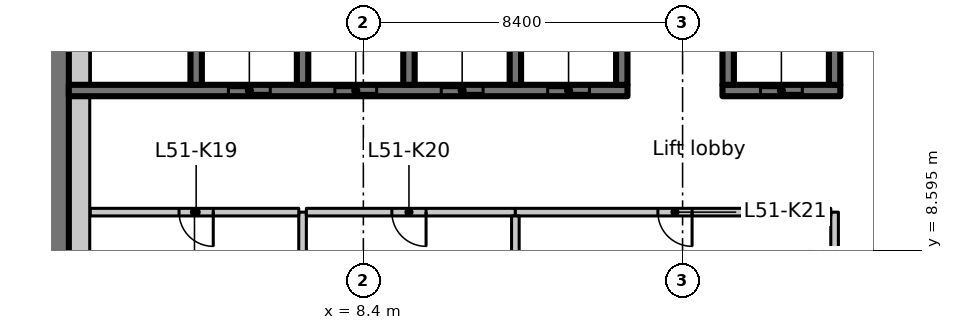
"""IFC4 building model, lengths in metres.
Left out: names, types, materials, properties, quantities, classifications, styles, units other than length and angle.
Written with IfcOpenShell. Run it as: python <this file> out.ifc"""

import sys

from ifc_helpers import new_model, si_unit, direction, frame, frame_2d, origin, place, context, subcontext, project, spatial, rectangle, extrude, element, fill, save


model = new_model("IFC4")
c1 = context("Model", 3, precision=1e-05, world=origin(), true_north=direction((0.0, 1.0)))
c2 = subcontext(c1, "Body", "Model", "MODEL_VIEW")
j1 = project(units=[si_unit("LENGTHUNIT", "METRE"), si_unit("PLANEANGLEUNIT", "RADIAN")], contexts=[c1])
p1 = place(None, origin())
s1 = spatial("IfcSite", under=j1, at=p1, CompositionType="ELEMENT")
p2 = place(p1, origin())
s2 = spatial("IfcBuilding", under=s1, at=p2, CompositionType="ELEMENT")
p3 = place(p2, frame((0.0, 0.0, 202.8)))
s3 = spatial("IfcBuildingStorey", under=s2, at=p3, CompositionType="ELEMENT", Elevation=202.8)
p4 = place(p3, frame((0.325, 7.286, 0.0), z_axis=(0.0, 0.0, 1.0), x_axis=(0.0, 1.0, 0.0)))
e1 = element("IfcWall", 1, at=p4, inside=s3, PredefinedType="SHEAR", context=c2, shape_type="SweptSolid", body=[
    extrude(rectangle(XDim=8.864, YDim=0.65, at=frame_2d((4.432, 0.0))), origin(), (0.0, 0.0, 1.0), 3.3),
])
p5 = place(p3, frame((0.65, 12.8, 0.0), z_axis=(0.0, 0.0, 1.0), x_axis=(1.0, 0.0, 0.0)))
e2 = element("IfcWall", 2, at=p5, inside=s3, PredefinedType="SHEAR", context=c2, shape_type="SweptSolid", body=[
    extrude(rectangle(XDim=14.7, YDim=0.3, at=frame_2d((7.35, 0.0))), origin(), (0.0, 0.0, 1.0), 3.3),
])
p6 = place(p5, frame((4.2, 0.0, 0.0)))
e3 = element("IfcOpeningElement", 3, at=p6, cuts=e2, PredefinedType="OPENING", context=c2, shape_type="SweptSolid", body=[
    extrude(rectangle(XDim=1.1, YDim=2.3, at=frame_2d((0.55, 1.15))), frame((0.0, 0.16, 0.0), z_axis=(0.0, -1.0, 0.0), x_axis=(1.0, 0.0, 0.0)), (0.0, 0.0, 1.0), 0.32),
])
p7 = place(p5, frame((7.0, 0.0, 0.0)))
e4 = element("IfcOpeningElement", 4, at=p7, cuts=e2, PredefinedType="OPENING", context=c2, shape_type="SweptSolid", body=[
    extrude(rectangle(XDim=1.1, YDim=2.3, at=frame_2d((0.55, 1.15))), frame((0.0, 0.16, 0.0), z_axis=(0.0, -1.0, 0.0), x_axis=(1.0, 0.0, 0.0)), (0.0, 0.0, 1.0), 0.32),
])
p8 = place(p5, frame((9.8, 0.0, 0.0)))
e5 = element("IfcOpeningElement", 5, at=p8, cuts=e2, PredefinedType="OPENING", context=c2, shape_type="SweptSolid", body=[
    extrude(rectangle(XDim=1.1, YDim=2.3, at=frame_2d((0.55, 1.15))), frame((0.0, 0.16, 0.0), z_axis=(0.0, -1.0, 0.0), x_axis=(1.0, 0.0, 0.0)), (0.0, 0.0, 1.0), 0.32),
])
p9 = place(p5, frame((12.6, 0.0, 0.0)))
e6 = element("IfcOpeningElement", 6, at=p9, cuts=e2, PredefinedType="OPENING", context=c2, shape_type="SweptSolid", body=[
    extrude(rectangle(XDim=1.1, YDim=2.3, at=frame_2d((0.55, 1.15))), frame((0.0, 0.16, 0.0), z_axis=(0.0, -1.0, 0.0), x_axis=(1.0, 0.0, 0.0)), (0.0, 0.0, 1.0), 0.32),
])
for number, where, z_axis, x_axis in (
    (7, (4.0, 12.95, 0.0), (0.0, 0.0, 1.0), (0.0, 1.0, 0.0)),
    (8, (6.8, 12.95, 0.0), (0.0, 0.0, 1.0), (0.0, 1.0, 0.0)),
    (9, (9.6, 12.95, 0.0), (0.0, 0.0, 1.0), (0.0, 1.0, 0.0)),
    (10, (12.4, 12.95, 0.0), (0.0, 0.0, 1.0), (0.0, 1.0, 0.0)),
    (11, (15.2, 12.95, 0.0), (0.0, 0.0, 1.0), (0.0, 1.0, 0.0)),
):
    element("IfcWall", number, at=place(p3, frame(where, z_axis=z_axis, x_axis=x_axis)), inside=s3, PredefinedType="SHEAR", context=c2, shape_type="SweptSolid", body=[
        extrude(rectangle(XDim=3.2, YDim=0.3, at=frame_2d((1.6, 0.0))), origin(), (0.0, 0.0, 1.0), 3.3),
    ])
p10 = place(p3, frame((17.85, 12.8, 0.0), z_axis=(0.0, 0.0, 1.0), x_axis=(1.0, 0.0, 0.0)))
e12 = element("IfcWall", 12, at=p10, inside=s3, PredefinedType="SHEAR", context=c2, shape_type="SweptSolid", body=[
    extrude(rectangle(XDim=3.1, YDim=0.3, at=frame_2d((1.55, 0.0))), origin(), (0.0, 0.0, 1.0), 3.3),
])
p11 = place(p10, frame((1.0, 0.0, 0.0)))
e13 = element("IfcOpeningElement", 13, at=p11, cuts=e12, PredefinedType="OPENING", context=c2, shape_type="SweptSolid", body=[
    extrude(rectangle(XDim=1.1, YDim=2.3, at=frame_2d((0.55, 1.15))), frame((0.0, 0.16, 0.0), z_axis=(0.0, -1.0, 0.0), x_axis=(1.0, 0.0, 0.0)), (0.0, 0.0, 1.0), 0.32),
])
for number, where, z_axis, x_axis in (
    (14, (18.0, 12.95, 0.0), (0.0, 0.0, 1.0), (0.0, 1.0, 0.0)),
    (15, (20.8, 12.95, 0.0), (0.0, 0.0, 1.0), (0.0, 1.0, 0.0)),
):
    element("IfcWall", number, at=place(p3, frame(where, z_axis=z_axis, x_axis=x_axis)), inside=s3, PredefinedType="SHEAR", context=c2, shape_type="SweptSolid", body=[
        extrude(rectangle(XDim=3.2, YDim=0.3, at=frame_2d((1.6, 0.0))), origin(), (0.0, 0.0, 1.0), 3.3),
    ])
p12 = place(p3, frame((6.8, 9.6, 0.0), z_axis=(0.0, 0.0, 1.0), x_axis=(0.0, -1.0, 0.0)))
e16 = element("IfcWall", 16, at=p12, inside=s3, PredefinedType="PARTITIONING", context=c2, shape_type="SweptSolid", body=[
    extrude(rectangle(XDim=2.5, YDim=0.2, at=frame_2d((1.25, 0.0))), origin(), (0.0, 0.0, 1.0), 3.3),
])
p13 = place(p3, frame((6.7, 9.6, 0.0), z_axis=(0.0, 0.0, 1.0), x_axis=(-1.0, 0.0, 0.0)))
e17 = element("IfcWall", 17, at=p13, inside=s3, PredefinedType="PARTITIONING", context=c2, shape_type="SweptSolid", body=[
    extrude(rectangle(XDim=5.488, YDim=0.2, at=frame_2d((2.744, 0.0))), origin(), (0.0, 0.0, 1.0), 3.3),
])
p14 = place(p13, frame((2.25, 0.0, 0.0)))
e18 = element("IfcOpeningElement", 18, at=p14, cuts=e17, PredefinedType="OPENING", context=c2, shape_type="SweptSolid", body=[
    extrude(rectangle(XDim=0.9, YDim=2.1, at=frame_2d((0.45, 1.05))), frame((0.0, 0.11, 0.0), z_axis=(0.0, -1.0, 0.0), x_axis=(1.0, 0.0, 0.0)), (0.0, 0.0, 1.0), 0.22),
])
p15 = place(p3, frame((12.4, 9.6, 0.0), z_axis=(0.0, 0.0, 1.0), x_axis=(-1.0, 0.0, 0.0)))
e19 = element("IfcWall", 19, at=p15, inside=s3, PredefinedType="PARTITIONING", context=c2, shape_type="SweptSolid", body=[
    extrude(rectangle(XDim=5.5, YDim=0.2, at=frame_2d((2.75, 0.0))), origin(), (0.0, 0.0, 1.0), 3.3),
])
p16 = place(p15, frame((2.35, 0.0, 0.0)))
e20 = element("IfcOpeningElement", 20, at=p16, cuts=e19, PredefinedType="OPENING", context=c2, shape_type="SweptSolid", body=[
    extrude(rectangle(XDim=0.9, YDim=2.1, at=frame_2d((0.45, 1.05))), frame((0.0, 0.11, 0.0), z_axis=(0.0, -1.0, 0.0), x_axis=(1.0, 0.0, 0.0)), (0.0, 0.0, 1.0), 0.22),
])
p17 = place(p3, frame((20.8, 7.1, 0.0), z_axis=(0.0, 0.0, 1.0), x_axis=(0.0, 1.0, 0.0)))
e21 = element("IfcWall", 21, at=p17, inside=s3, PredefinedType="PARTITIONING", context=c2, shape_type="SweptSolid", body=[
    extrude(rectangle(XDim=2.5, YDim=0.2, at=frame_2d((1.25, 0.0))), origin(), (0.0, 0.0, 1.0), 3.3),
])
p18 = place(p3, frame((20.7, 9.6, 0.0), z_axis=(0.0, 0.0, 1.0), x_axis=(-1.0, 0.0, 0.0)))
e22 = element("IfcWall", 22, at=p18, inside=s3, PredefinedType="PARTITIONING", context=c2, shape_type="SweptSolid", body=[
    extrude(rectangle(XDim=8.3, YDim=0.2, at=frame_2d((4.15, 0.0))), origin(), (0.0, 0.0, 1.0), 3.3),
])
p19 = place(p18, frame((3.65, 0.0, 0.0)))
e23 = element("IfcOpeningElement", 23, at=p19, cuts=e22, PredefinedType="OPENING", context=c2, shape_type="SweptSolid", body=[
    extrude(rectangle(XDim=0.9, YDim=2.1, at=frame_2d((0.45, 1.05))), frame((0.0, 0.11, 0.0), z_axis=(0.0, -1.0, 0.0), x_axis=(1.0, 0.0, 0.0)), (0.0, 0.0, 1.0), 0.22),
])
p20 = place(p3, frame((12.4, 9.5, 0.0), z_axis=(0.0, 0.0, 1.0), x_axis=(0.0, -1.0, 0.0)))
e24 = element("IfcWall", 24, at=p20, inside=s3, PredefinedType="PARTITIONING", context=c2, shape_type="SweptSolid", body=[
    extrude(rectangle(XDim=2.4, YDim=0.2, at=frame_2d((1.2, 0.0))), origin(), (0.0, 0.0, 1.0), 3.3),
])
p21 = place(p3, frame((0.925, 7.286, 0.0), z_axis=(0.0, 0.0, 1.0), x_axis=(0.0, 1.0, 0.0)))
e25 = element("IfcWall", 25, at=p21, inside=s3, PredefinedType="PARTITIONING", context=c2, shape_type="SweptSolid", body=[
    extrude(rectangle(XDim=5.364, YDim=0.55, at=frame_2d((2.682, 0.0))), origin(), (0.0, 0.0, 1.0), 3.3),
])
p22 = place(p3, frame((0.925, 12.95, 0.0), z_axis=(0.0, 0.0, 1.0), x_axis=(0.0, 1.0, 0.0)))
e26 = element("IfcWall", 26, at=p22, inside=s3, PredefinedType="PARTITIONING", context=c2, shape_type="SweptSolid", body=[
    extrude(rectangle(XDim=2.65, YDim=0.55, at=frame_2d((1.325, 0.0))), origin(), (0.0, 0.0, 1.0), 3.3),
])
p23 = place(p6, origin())
e27 = element("IfcDoor", 27, at=p23, inside=s3, OperationType="SLIDING_TO_LEFT", PredefinedType="DOOR", context=c2, shape_type="SweptSolid", body=[
    extrude(rectangle(XDim=1.1, YDim=2.3, at=frame_2d((0.55, 1.15))), frame((0.0, 0.025, 0.0), z_axis=(0.0, -1.0, 0.0), x_axis=(1.0, 0.0, 0.0)), (0.0, 0.0, 1.0), 0.05),
])
fill(e3, e27)
p24 = place(p7, origin())
e28 = element("IfcDoor", 28, at=p24, inside=s3, OperationType="SLIDING_TO_LEFT", PredefinedType="DOOR", context=c2, shape_type="SweptSolid", body=[
    extrude(rectangle(XDim=1.1, YDim=2.3, at=frame_2d((0.55, 1.15))), frame((0.0, 0.025, 0.0), z_axis=(0.0, -1.0, 0.0), x_axis=(1.0, 0.0, 0.0)), (0.0, 0.0, 1.0), 0.05),
])
fill(e4, e28)
p25 = place(p8, origin())
e29 = element("IfcDoor", 29, at=p25, inside=s3, OperationType="SLIDING_TO_LEFT", PredefinedType="DOOR", context=c2, shape_type="SweptSolid", body=[
    extrude(rectangle(XDim=1.1, YDim=2.3, at=frame_2d((0.55, 1.15))), frame((0.0, 0.025, 0.0), z_axis=(0.0, -1.0, 0.0), x_axis=(1.0, 0.0, 0.0)), (0.0, 0.0, 1.0), 0.05),
])
fill(e5, e29)
p26 = place(p9, origin())
e30 = element("IfcDoor", 30, at=p26, inside=s3, OperationType="SLIDING_TO_LEFT", PredefinedType="DOOR", context=c2, shape_type="SweptSolid", body=[
    extrude(rectangle(XDim=1.1, YDim=2.3, at=frame_2d((0.55, 1.15))), frame((0.0, 0.025, 0.0), z_axis=(0.0, -1.0, 0.0), x_axis=(1.0, 0.0, 0.0)), (0.0, 0.0, 1.0), 0.05),
])
fill(e6, e30)
p27 = place(p11, origin())
e31 = element("IfcDoor", 31, at=p27, inside=s3, OperationType="SLIDING_TO_LEFT", PredefinedType="DOOR", context=c2, shape_type="SweptSolid", body=[
    extrude(rectangle(XDim=1.1, YDim=2.3, at=frame_2d((0.55, 1.15))), frame((0.0, 0.025, 0.0), z_axis=(0.0, -1.0, 0.0), x_axis=(1.0, 0.0, 0.0)), (0.0, 0.0, 1.0), 0.05),
])
fill(e13, e31)
p28 = place(p14, origin())
e32 = element("IfcDoor", 32, at=p28, inside=s3, OperationType="SINGLE_SWING_LEFT", PredefinedType="DOOR", context=c2, shape_type="SweptSolid", body=[
    extrude(rectangle(XDim=0.9, YDim=2.1, at=frame_2d((0.45, 1.05))), frame((0.0, 0.025, 0.0), z_axis=(0.0, -1.0, 0.0), x_axis=(1.0, 0.0, 0.0)), (0.0, 0.0, 1.0), 0.05),
])
fill(e18, e32)
p29 = place(p16, origin())
e33 = element("IfcDoor", 33, at=p29, inside=s3, OperationType="SINGLE_SWING_RIGHT", PredefinedType="DOOR", context=c2, shape_type="SweptSolid", body=[
    extrude(rectangle(XDim=0.9, YDim=2.1, at=frame_2d((0.45, 1.05))), frame((0.0, 0.025, 0.0), z_axis=(0.0, -1.0, 0.0), x_axis=(1.0, 0.0, 0.0)), (0.0, 0.0, 1.0), 0.05),
])
fill(e20, e33)
p30 = place(p19, origin())
e34 = element("IfcDoor", 34, at=p30, inside=s3, OperationType="SINGLE_SWING_LEFT", PredefinedType="DOOR", context=c2, shape_type="SweptSolid", body=[
    extrude(rectangle(XDim=0.9, YDim=2.1, at=frame_2d((0.45, 1.05))), frame((0.0, 0.025, 0.0), z_axis=(0.0, -1.0, 0.0), x_axis=(1.0, 0.0, 0.0)), (0.0, 0.0, 1.0), 0.05),
])
fill(e23, e34)
save(model, sys.argv[1])
